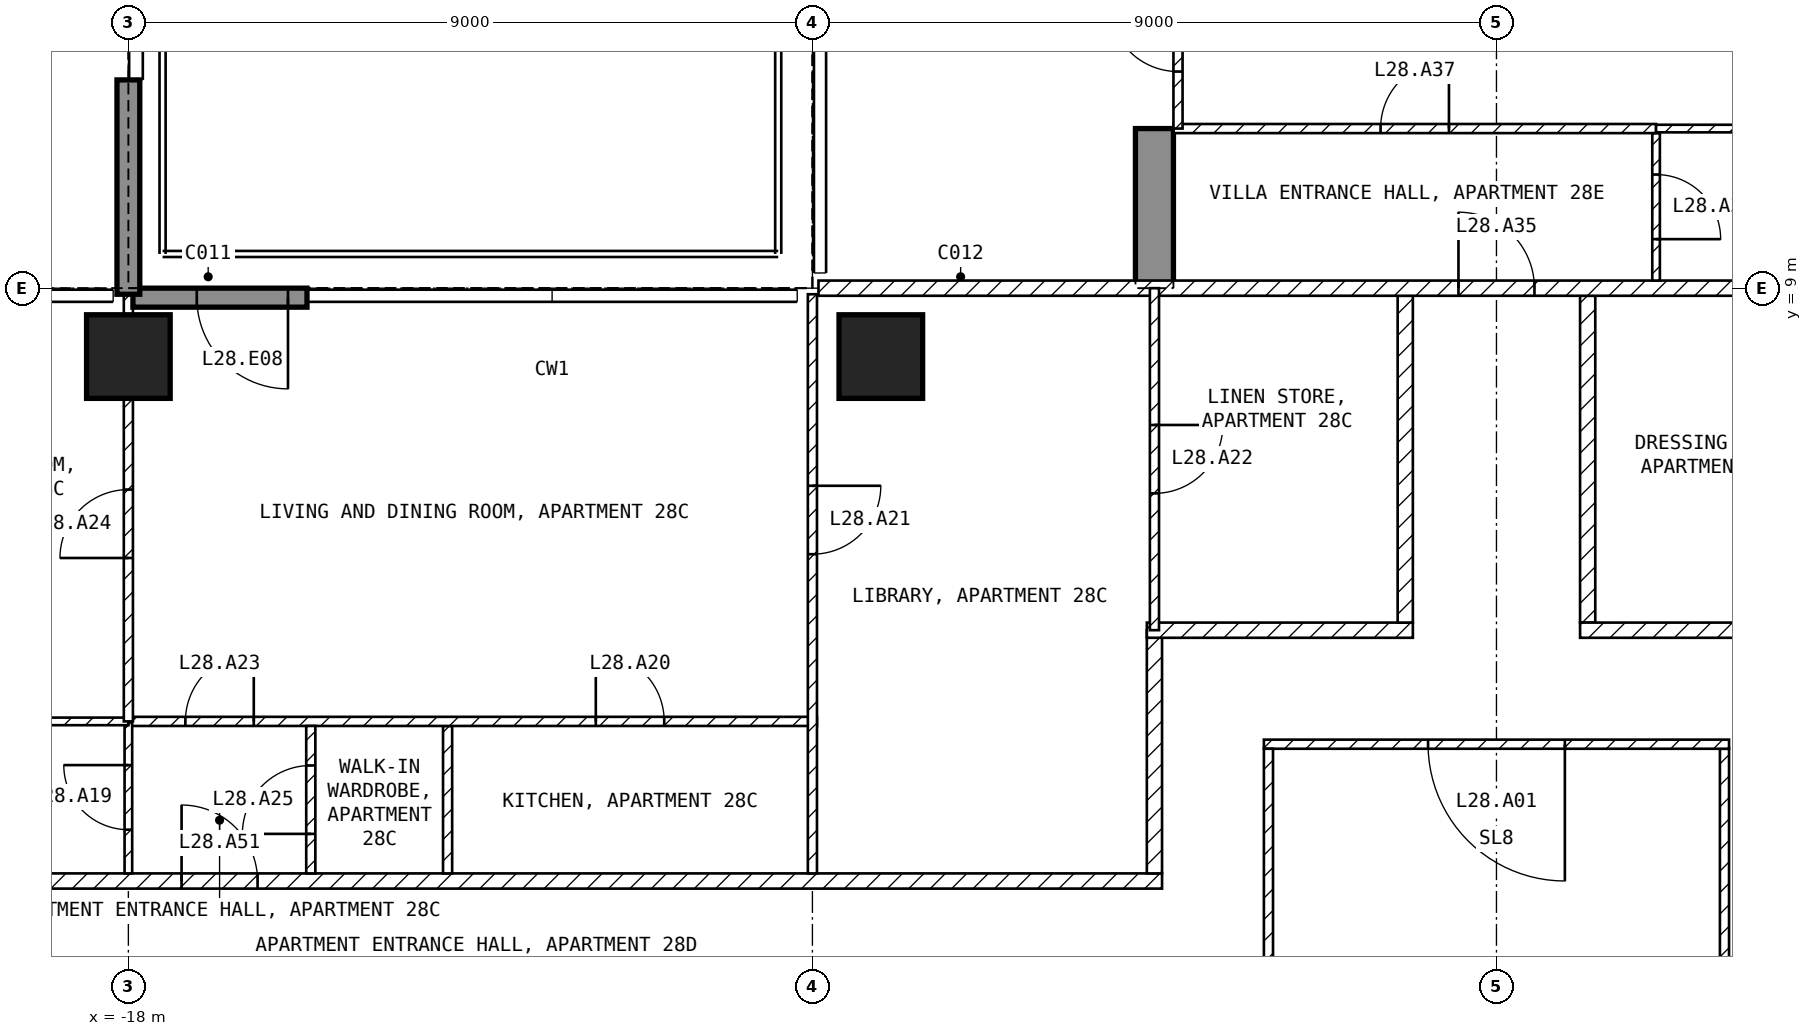
"""IFC4 building model, lengths in metres.
Left out: names, types, materials, properties, quantities, classifications, styles, units other than length and angle.
Written with IfcOpenShell. Run it as: python <this file> out.ifc"""

import sys

from ifc_helpers import new_model, si_unit, direction, frame, frame_2d, origin, origin_2d, place, context, subcontext, project, spatial, polyline, rectangle, outline, extrude, element, fill, save


model = new_model("IFC4")
c1 = context("Model", 3, precision=1e-05, world=origin(), true_north=direction((0.0, 1.0)))
c2 = subcontext(c1, "Body", "Model", "MODEL_VIEW")
j1 = project(units=[si_unit("LENGTHUNIT", "METRE"), si_unit("PLANEANGLEUNIT", "RADIAN")], contexts=[c1])
p1 = place(None, origin())
s1 = spatial("IfcSite", under=j1, at=p1, CompositionType="ELEMENT")
p2 = place(p1, origin())
s2 = spatial("IfcBuilding", under=s1, at=p2, CompositionType="ELEMENT")
p3 = place(p2, frame((0.0, 0.0, 119.9)))
s3 = spatial("IfcBuildingStorey", under=s2, at=p3, CompositionType="ELEMENT", Elevation=119.9)
for number, where, z_axis, x_axis in (
    (1, (-18.0, 8.1, -0.25), (0.0, 0.0, 1.0), (1.0, 0.0, 0.0)),
    (2, (-8.1, 8.1, -0.25), (0.0, 0.0, 1.0), (1.0, 0.0, 0.0)),
):
    element("IfcColumn", number, at=place(p3, frame(where, z_axis=z_axis, x_axis=x_axis)), inside=s3, PredefinedType="COLUMN", context=c2, shape_type="SweptSolid", body=[
        extrude(rectangle(XDim=1.1, YDim=1.1, at=origin_2d()), origin(), (0.0, 0.0, 1.0), 3.5),
    ])
p4 = place(p3, frame((-4.75, 9.0, -0.25), z_axis=(1.0, 0.0, 0.0), x_axis=(0.0, 1.0, 0.0)))
e3 = element("IfcWall", 3, at=p4, inside=s3, PredefinedType="SHEAR", context=c2, shape_type="SweptSolid", body=[
    extrude(outline(polyline([(0.0, 0.0), (2.1, 0.0), (2.1, 2.65), (4.5, 2.65), (4.5, 0.0), (9.9, 0.0), (9.9, 2.65), (12.3, 2.65), (12.3, 0.0), (16.55, 0.0), (16.55, 3.5), (0.0, 3.5), (0.0, 0.0)])), origin(), (0.0, 0.0, 1.0), 0.5),
])
p5 = place(p3, frame((-15.65, 8.875, 0.0), z_axis=(0.0, 0.0, 1.0), x_axis=(-1.0, 0.0, 0.0)))
e4 = element("IfcWall", 4, at=p5, inside=s3, PredefinedType="SOLIDWALL", context=c2, shape_type="SweptSolid", body=[
    extrude(rectangle(XDim=2.29, YDim=0.25, at=frame_2d((1.145, 0.0))), origin(), (0.0, 0.0, 1.0), 3.25),
])
p6 = place(p5, frame((0.25, 0.0, 0.0)))
e5 = element("IfcOpeningElement", 5, at=p6, cuts=e4, PredefinedType="OPENING", context=c2, shape_type="SweptSolid", body=[
    extrude(rectangle(XDim=1.2, YDim=2.4, at=frame_2d((0.6, 1.2))), frame((0.0, 0.135, 0.0), z_axis=(0.0, -1.0, 0.0), x_axis=(1.0, 0.0, 0.0)), (0.0, 0.0, 1.0), 0.27),
])
p7 = place(p3, frame((-18.0, 8.92, 0.0), z_axis=(0.0, 0.0, 1.0), x_axis=(0.0, 1.0, 0.0)))
e6 = element("IfcWall", 6, at=p7, inside=s3, PredefinedType="SOLIDWALL", context=c2, shape_type="SweptSolid", body=[
    extrude(rectangle(XDim=2.82, YDim=0.3, at=frame_2d((1.41, 0.0))), origin(), (0.0, 0.0, 1.0), 3.25),
])
p8 = place(p3, frame((3.0, -2.94, 0.0), z_axis=(0.0, 0.0, 1.0), x_axis=(0.0, 1.0, 0.0)))
e7 = element("IfcWall", 7, at=p8, inside=s3, PredefinedType="PARTITIONING", context=c2, shape_type="SweptSolid", body=[
    extrude(rectangle(XDim=5.88, YDim=0.12, at=frame_2d((2.94, 0.0))), origin(), (0.0, 0.0, 1.0), 3.25),
])
p9 = place(p3, frame((3.06, 3.0, 0.0), z_axis=(0.0, 0.0, 1.0), x_axis=(-1.0, 0.0, 0.0)))
e8 = element("IfcWall", 8, at=p9, inside=s3, PredefinedType="PARTITIONING", context=c2, shape_type="SweptSolid", body=[
    extrude(rectangle(XDim=6.12, YDim=0.12, at=frame_2d((3.06, 0.0))), origin(), (0.0, 0.0, 1.0), 3.25),
])
p10 = place(p9, frame((2.16, 0.0, 0.0)))
e9 = element("IfcOpeningElement", 9, at=p10, cuts=e8, PredefinedType="OPENING", context=c2, shape_type="SweptSolid", body=[
    extrude(rectangle(XDim=1.8, YDim=2.1, at=frame_2d((0.9, 1.05))), frame((0.0, 0.07, 0.0), z_axis=(0.0, -1.0, 0.0), x_axis=(1.0, 0.0, 0.0)), (0.0, 0.0, 1.0), 0.14),
])
p11 = place(p3, frame((-3.0, 2.94, 0.0), z_axis=(0.0, 0.0, 1.0), x_axis=(0.0, -1.0, 0.0)))
e10 = element("IfcWall", 10, at=p11, inside=s3, PredefinedType="PARTITIONING", context=c2, shape_type="SweptSolid", body=[
    extrude(rectangle(XDim=5.88, YDim=0.12, at=frame_2d((2.94, 0.0))), origin(), (0.0, 0.0, 1.0), 3.25),
])
p12 = place(p3, frame((1.2, 8.9, 0.0), z_axis=(0.0, 0.0, 1.0), x_axis=(0.0, -1.0, 0.0)))
e11 = element("IfcWall", 11, at=p12, inside=s3, PredefinedType="PARTITIONING", context=c2, shape_type="SweptSolid", body=[
    extrude(rectangle(XDim=4.3, YDim=0.2, at=frame_2d((2.15, 0.0))), origin(), (0.0, 0.0, 1.0), 3.25),
])
p13 = place(p3, frame((1.1, 4.5, 0.0), z_axis=(0.0, 0.0, 1.0), x_axis=(1.0, 0.0, 0.0)))
e12 = element("IfcWall", 12, at=p13, inside=s3, PredefinedType="PARTITIONING", context=c2, shape_type="SweptSolid", body=[
    extrude(rectangle(XDim=3.5, YDim=0.2, at=frame_2d((1.75, 0.0))), origin(), (0.0, 0.0, 1.0), 3.25),
])
p14 = place(p3, frame((-21.6, 1.2, 0.0), z_axis=(0.0, 0.0, 1.0), x_axis=(1.0, 0.0, 0.0)))
e13 = element("IfcWall", 13, at=p14, inside=s3, PredefinedType="PARTITIONING", context=c2, shape_type="SweptSolid", body=[
    extrude(rectangle(XDim=17.2, YDim=0.2, at=frame_2d((8.6, 0.0))), origin(), (0.0, 0.0, 1.0), 3.25),
])
p15 = place(p14, frame((4.3, 0.0, 0.0)))
e14 = element("IfcOpeningElement", 14, at=p15, cuts=e13, PredefinedType="OPENING", context=c2, shape_type="SweptSolid", body=[
    extrude(rectangle(XDim=1.0, YDim=2.1, at=frame_2d((0.5, 1.05))), frame((0.0, 0.11, 0.0), z_axis=(0.0, -1.0, 0.0), x_axis=(1.0, 0.0, 0.0)), (0.0, 0.0, 1.0), 0.22),
])
p16 = place(p3, frame((-4.5, 1.3, 0.0), z_axis=(0.0, 0.0, 1.0), x_axis=(0.0, 1.0, 0.0)))
e15 = element("IfcWall", 15, at=p16, inside=s3, PredefinedType="PARTITIONING", context=c2, shape_type="SweptSolid", body=[
    extrude(rectangle(XDim=3.2, YDim=0.2, at=frame_2d((1.6, 0.0))), origin(), (0.0, 0.0, 1.0), 3.25),
])
p17 = place(p3, frame((-4.6, 4.5, 0.0), z_axis=(0.0, 0.0, 1.0), x_axis=(1.0, 0.0, 0.0)))
e16 = element("IfcWall", 16, at=p17, inside=s3, PredefinedType="PARTITIONING", context=c2, shape_type="SweptSolid", body=[
    extrude(rectangle(XDim=3.5, YDim=0.2, at=frame_2d((1.75, 0.0))), origin(), (0.0, 0.0, 1.0), 3.25),
])
p18 = place(p3, frame((-1.2, 4.6, 0.0), z_axis=(0.0, 0.0, 1.0), x_axis=(0.0, 1.0, 0.0)))
e17 = element("IfcWall", 17, at=p18, inside=s3, PredefinedType="PARTITIONING", context=c2, shape_type="SweptSolid", body=[
    extrude(rectangle(XDim=4.3, YDim=0.2, at=frame_2d((2.15, 0.0))), origin(), (0.0, 0.0, 1.0), 3.25),
])
p19 = place(p3, frame((-8.92, 9.0, 0.0), z_axis=(0.0, 0.0, 1.0), x_axis=(1.0, 0.0, 0.0)))
e18 = element("IfcWall", 18, at=p19, inside=s3, PredefinedType="PARTITIONING", context=c2, shape_type="SweptSolid", body=[
    extrude(rectangle(XDim=17.84, YDim=0.2, at=frame_2d((8.92, 0.0))), origin(), (0.0, 0.0, 1.0), 3.25),
])
p20 = place(p19, frame((8.42, 0.0, 0.0)))
e19 = element("IfcOpeningElement", 19, at=p20, cuts=e18, PredefinedType="OPENING", context=c2, shape_type="SweptSolid", body=[
    extrude(rectangle(XDim=1.0, YDim=2.1, at=frame_2d((0.5, 1.05))), frame((0.0, 0.11, 0.0), z_axis=(0.0, -1.0, 0.0), x_axis=(1.0, 0.0, 0.0)), (0.0, 0.0, 1.0), 0.22),
])
p21 = place(p3, frame((-13.8, 1.3, 0.0), z_axis=(0.0, 0.0, 1.0), x_axis=(0.0, 1.0, 0.0)))
e20 = element("IfcWall", 20, at=p21, inside=s3, PredefinedType="PARTITIONING", context=c2, shape_type="SweptSolid", body=[
    extrude(rectangle(XDim=1.94, YDim=0.12, at=frame_2d((0.97, 0.0))), origin(), (0.0, 0.0, 1.0), 3.25),
])
p22 = place(p3, frame((-18.0, 3.3, 0.0), z_axis=(0.0, 0.0, 1.0), x_axis=(1.0, 0.0, 0.0)))
e21 = element("IfcWall", 21, at=p22, inside=s3, PredefinedType="PARTITIONING", context=c2, shape_type="SweptSolid", body=[
    extrude(rectangle(XDim=9.06, YDim=0.12, at=frame_2d((4.53, 0.0))), origin(), (0.0, 0.0, 1.0), 3.25),
])
p23 = place(p22, frame((6.15, 0.0, 0.0)))
e22 = element("IfcOpeningElement", 22, at=p23, cuts=e21, PredefinedType="OPENING", context=c2, shape_type="SweptSolid", body=[
    extrude(rectangle(XDim=0.9, YDim=2.1, at=frame_2d((0.45, 1.05))), frame((0.0, 0.07, 0.0), z_axis=(0.0, -1.0, 0.0), x_axis=(1.0, 0.0, 0.0)), (0.0, 0.0, 1.0), 0.14),
])
p24 = place(p22, frame((0.75, 0.0, 0.0)))
e23 = element("IfcOpeningElement", 23, at=p24, cuts=e21, PredefinedType="OPENING", context=c2, shape_type="SweptSolid", body=[
    extrude(rectangle(XDim=0.9, YDim=2.1, at=frame_2d((0.45, 1.05))), frame((0.0, 0.07, 0.0), z_axis=(0.0, -1.0, 0.0), x_axis=(1.0, 0.0, 0.0)), (0.0, 0.0, 1.0), 0.14),
])
p25 = place(p3, frame((-9.0, 8.92, 0.0), z_axis=(0.0, 0.0, 1.0), x_axis=(0.0, -1.0, 0.0)))
e24 = element("IfcWall", 24, at=p25, inside=s3, PredefinedType="PARTITIONING", context=c2, shape_type="SweptSolid", body=[
    extrude(rectangle(XDim=7.62, YDim=0.12, at=frame_2d((3.81, 0.0))), origin(), (0.0, 0.0, 1.0), 3.25),
])
p26 = place(p25, frame((2.52, 0.0, 0.0)))
e25 = element("IfcOpeningElement", 25, at=p26, cuts=e24, PredefinedType="OPENING", context=c2, shape_type="SweptSolid", body=[
    extrude(rectangle(XDim=0.9, YDim=2.1, at=frame_2d((0.45, 1.05))), frame((0.0, 0.07, 0.0), z_axis=(0.0, -1.0, 0.0), x_axis=(1.0, 0.0, 0.0)), (0.0, 0.0, 1.0), 0.14),
])
p27 = place(p3, frame((-15.6, 1.3, 0.0), z_axis=(0.0, 0.0, 1.0), x_axis=(0.0, 1.0, 0.0)))
e26 = element("IfcWall", 26, at=p27, inside=s3, PredefinedType="PARTITIONING", context=c2, shape_type="SweptSolid", body=[
    extrude(rectangle(XDim=1.94, YDim=0.12, at=frame_2d((0.97, 0.0))), origin(), (0.0, 0.0, 1.0), 3.25),
])
p28 = place(p27, frame((0.52, 0.0, 0.0)))
e27 = element("IfcOpeningElement", 27, at=p28, cuts=e26, PredefinedType="OPENING", context=c2, shape_type="SweptSolid", body=[
    extrude(rectangle(XDim=0.9, YDim=2.1, at=frame_2d((0.45, 1.05))), frame((0.0, 0.07, 0.0), z_axis=(0.0, -1.0, 0.0), x_axis=(1.0, 0.0, 0.0)), (0.0, 0.0, 1.0), 0.14),
])
p29 = place(p3, frame((-18.0, 1.3, 0.0), z_axis=(0.0, 0.0, 1.0), x_axis=(0.0, 1.0, 0.0)))
e28 = element("IfcWall", 28, at=p29, inside=s3, PredefinedType="PARTITIONING", context=c2, shape_type="SweptSolid", body=[
    extrude(rectangle(XDim=2.0, YDim=0.1, at=frame_2d((1.0, 0.0))), origin(), (0.0, 0.0, 1.0), 2.414),
])
p30 = place(p29, frame((0.575, 0.0, 0.0)))
e29 = element("IfcOpeningElement", 29, at=p30, cuts=e28, PredefinedType="OPENING", context=c2, shape_type="SweptSolid", body=[
    extrude(rectangle(XDim=0.85, YDim=2.1, at=frame_2d((0.425, 1.05))), frame((0.0, 0.06, 0.0), z_axis=(0.0, -1.0, 0.0), x_axis=(1.0, 0.0, 0.0)), (0.0, 0.0, 1.0), 0.12),
])
p31 = place(p3, frame((-21.6, 3.3, 0.0), z_axis=(0.0, 0.0, 1.0), x_axis=(1.0, 0.0, 0.0)))
e30 = element("IfcWall", 30, at=p31, inside=s3, PredefinedType="PARTITIONING", context=c2, shape_type="SweptSolid", body=[
    extrude(rectangle(XDim=3.6, YDim=0.1, at=frame_2d((1.8, 0.0))), origin(), (0.0, 0.0, 1.0), 3.25),
])
p32 = place(p3, frame((-18.0, 3.3, 0.0), z_axis=(0.0, 0.0, 1.0), x_axis=(0.0, 1.0, 0.0)))
e31 = element("IfcWall", 31, at=p32, inside=s3, PredefinedType="PARTITIONING", context=c2, shape_type="SweptSolid", body=[
    extrude(rectangle(XDim=5.62, YDim=0.12, at=frame_2d((2.81, 0.0))), origin(), (0.0, 0.0, 1.0), 2.414),
])
p33 = place(p32, frame((2.15, 0.0, 0.0)))
e32 = element("IfcOpeningElement", 32, at=p33, cuts=e31, PredefinedType="OPENING", context=c2, shape_type="SweptSolid", body=[
    extrude(rectangle(XDim=0.9, YDim=2.1, at=frame_2d((0.45, 1.05))), frame((0.0, 0.07, 0.0), z_axis=(0.0, -1.0, 0.0), x_axis=(1.0, 0.0, 0.0)), (0.0, 0.0, 1.0), 0.14),
])
p34 = place(p3, frame((-4.5, 9.0, 0.0), z_axis=(0.0, 0.0, 1.0), x_axis=(0.0, -1.0, 0.0)))
e33 = element("IfcWall", 33, at=p34, inside=s3, PredefinedType="PARTITIONING", context=c2, shape_type="SweptSolid", body=[
    extrude(rectangle(XDim=4.5, YDim=0.12, at=frame_2d((2.25, 0.0))), origin(), (0.0, 0.0, 1.0), 3.25),
])
p35 = place(p34, frame((1.8, 0.0, 0.0)))
e34 = element("IfcOpeningElement", 34, at=p35, cuts=e33, PredefinedType="OPENING", context=c2, shape_type="SweptSolid", body=[
    extrude(rectangle(XDim=0.9, YDim=2.1, at=frame_2d((0.45, 1.05))), frame((0.0, 0.07, 0.0), z_axis=(0.0, -1.0, 0.0), x_axis=(1.0, 0.0, 0.0)), (0.0, 0.0, 1.0), 0.14),
])
p36 = place(p3, frame((2.1, 11.04, 0.0), z_axis=(0.0, 0.0, 1.0), x_axis=(0.0, -1.0, 0.0)))
e35 = element("IfcWall", 35, at=p36, inside=s3, PredefinedType="PARTITIONING", context=c2, shape_type="SweptSolid", body=[
    extrude(rectangle(XDim=1.94, YDim=0.1, at=frame_2d((0.97, 0.0))), origin(), (0.0, 0.0, 1.0), 3.25),
])
p37 = place(p36, frame((0.545, 0.0, 0.0)))
e36 = element("IfcOpeningElement", 36, at=p37, cuts=e35, PredefinedType="OPENING", context=c2, shape_type="SweptSolid", body=[
    extrude(rectangle(XDim=0.85, YDim=2.1, at=frame_2d((0.425, 1.05))), frame((0.0, 0.06, 0.0), z_axis=(0.0, -1.0, 0.0), x_axis=(1.0, 0.0, 0.0)), (0.0, 0.0, 1.0), 0.12),
])
p38 = place(p3, frame((-4.25, 11.1, 0.0), z_axis=(0.0, 0.0, 1.0), x_axis=(1.0, 0.0, 0.0)))
e37 = element("IfcWall", 37, at=p38, inside=s3, PredefinedType="PARTITIONING", context=c2, shape_type="SweptSolid", body=[
    extrude(rectangle(XDim=6.35, YDim=0.12, at=frame_2d((3.175, 0.0))), origin(), (0.0, 0.0, 1.0), 3.25),
])
p39 = place(p38, frame((2.725, 0.0, 0.0)))
e38 = element("IfcOpeningElement", 38, at=p39, cuts=e37, PredefinedType="OPENING", context=c2, shape_type="SweptSolid", body=[
    extrude(rectangle(XDim=0.9, YDim=2.1, at=frame_2d((0.45, 1.05))), frame((0.0, 0.07, 0.0), z_axis=(0.0, -1.0, 0.0), x_axis=(1.0, 0.0, 0.0)), (0.0, 0.0, 1.0), 0.14),
])
p40 = place(p3, frame((2.1, 11.1, 0.0), z_axis=(0.0, 0.0, 1.0), x_axis=(1.0, 0.0, 0.0)))
e39 = element("IfcWall", 39, at=p40, inside=s3, PredefinedType="PARTITIONING", context=c2, shape_type="SweptSolid", body=[
    extrude(rectangle(XDim=2.15, YDim=0.1, at=frame_2d((1.075, 0.0))), origin(), (0.0, 0.0, 1.0), 3.25),
])
p41 = place(p3, frame((-4.19, 11.1, 0.0), z_axis=(0.0, 0.0, 1.0), x_axis=(0.0, 1.0, 0.0)))
e40 = element("IfcWall", 40, at=p41, inside=s3, PredefinedType="PARTITIONING", context=c2, shape_type="SweptSolid", body=[
    extrude(rectangle(XDim=2.4, YDim=0.12, at=frame_2d((1.2, 0.0))), origin(), (0.0, 0.0, 1.0), 2.4),
])
p42 = place(p41, frame((0.75, 0.0, 0.0)))
e41 = element("IfcOpeningElement", 41, at=p42, cuts=e40, PredefinedType="OPENING", context=c2, shape_type="SweptSolid", body=[
    extrude(rectangle(XDim=0.9, YDim=2.1, at=frame_2d((0.45, 1.05))), frame((0.0, 0.07, 0.0), z_axis=(0.0, -1.0, 0.0), x_axis=(1.0, 0.0, 0.0)), (0.0, 0.0, 1.0), 0.14),
])
p43 = place(p6, origin())
e42 = element("IfcDoor", 42, at=p43, inside=s3, OperationType="SINGLE_SWING_LEFT", PredefinedType="DOOR", context=c2, shape_type="SweptSolid", body=[
    extrude(rectangle(XDim=1.2, YDim=2.4, at=frame_2d((0.6, 1.2))), frame((0.0, 0.025, 0.0), z_axis=(0.0, -1.0, 0.0), x_axis=(1.0, 0.0, 0.0)), (0.0, 0.0, 1.0), 0.05),
])
fill(e5, e42)
p44 = place(p10, origin())
e43 = element("IfcDoor", 43, at=p44, inside=s3, OperationType="SINGLE_SWING_LEFT", PredefinedType="DOOR", context=c2, shape_type="SweptSolid", body=[
    extrude(rectangle(XDim=1.8, YDim=2.1, at=frame_2d((0.9, 1.05))), frame((0.0, 0.025, 0.0), z_axis=(0.0, -1.0, 0.0), x_axis=(1.0, 0.0, 0.0)), (0.0, 0.0, 1.0), 0.05),
])
fill(e9, e43)
p45 = place(p30, origin())
e44 = element("IfcDoor", 44, at=p45, inside=s3, OperationType="SINGLE_SWING_RIGHT", PredefinedType="DOOR", context=c2, shape_type="SweptSolid", body=[
    extrude(rectangle(XDim=0.85, YDim=2.1, at=frame_2d((0.425, 1.05))), frame((0.0, 0.025, 0.0), z_axis=(0.0, -1.0, 0.0), x_axis=(1.0, 0.0, 0.0)), (0.0, 0.0, 1.0), 0.05),
])
fill(e29, e44)
p46 = place(p23, origin())
e45 = element("IfcDoor", 45, at=p46, inside=s3, OperationType="SINGLE_SWING_LEFT", PredefinedType="DOOR", context=c2, shape_type="SweptSolid", body=[
    extrude(rectangle(XDim=0.9, YDim=2.1, at=frame_2d((0.45, 1.05))), frame((0.0, 0.025, 0.0), z_axis=(0.0, -1.0, 0.0), x_axis=(1.0, 0.0, 0.0)), (0.0, 0.0, 1.0), 0.05),
])
fill(e22, e45)
p47 = place(p26, origin())
e46 = element("IfcDoor", 46, at=p47, inside=s3, OperationType="SINGLE_SWING_LEFT", PredefinedType="DOOR", context=c2, shape_type="SweptSolid", body=[
    extrude(rectangle(XDim=0.9, YDim=2.1, at=frame_2d((0.45, 1.05))), frame((0.0, 0.025, 0.0), z_axis=(0.0, -1.0, 0.0), x_axis=(1.0, 0.0, 0.0)), (0.0, 0.0, 1.0), 0.05),
])
fill(e25, e46)
p48 = place(p35, origin())
e47 = element("IfcDoor", 47, at=p48, inside=s3, OperationType="SINGLE_SWING_LEFT", PredefinedType="DOOR", context=c2, shape_type="SweptSolid", body=[
    extrude(rectangle(XDim=0.9, YDim=2.1, at=frame_2d((0.45, 1.05))), frame((0.0, 0.025, 0.0), z_axis=(0.0, -1.0, 0.0), x_axis=(1.0, 0.0, 0.0)), (0.0, 0.0, 1.0), 0.05),
])
fill(e34, e47)
p49 = place(p24, origin())
e48 = element("IfcDoor", 48, at=p49, inside=s3, OperationType="SINGLE_SWING_RIGHT", PredefinedType="DOOR", context=c2, shape_type="SweptSolid", body=[
    extrude(rectangle(XDim=0.9, YDim=2.1, at=frame_2d((0.45, 1.05))), frame((0.0, 0.025, 0.0), z_axis=(0.0, -1.0, 0.0), x_axis=(1.0, 0.0, 0.0)), (0.0, 0.0, 1.0), 0.05),
])
fill(e23, e48)
p50 = place(p33, origin())
e49 = element("IfcDoor", 49, at=p50, inside=s3, OperationType="SINGLE_SWING_LEFT", PredefinedType="DOOR", context=c2, shape_type="SweptSolid", body=[
    extrude(rectangle(XDim=0.9, YDim=2.1, at=frame_2d((0.45, 1.05))), frame((0.0, 0.025, 0.0), z_axis=(0.0, -1.0, 0.0), x_axis=(1.0, 0.0, 0.0)), (0.0, 0.0, 1.0), 0.05),
])
fill(e32, e49)
p51 = place(p28, origin())
e50 = element("IfcDoor", 50, at=p51, inside=s3, OperationType="SINGLE_SWING_LEFT", PredefinedType="DOOR", context=c2, shape_type="SweptSolid", body=[
    extrude(rectangle(XDim=0.9, YDim=2.1, at=frame_2d((0.45, 1.05))), frame((0.0, 0.025, 0.0), z_axis=(0.0, -1.0, 0.0), x_axis=(1.0, 0.0, 0.0)), (0.0, 0.0, 1.0), 0.05),
])
fill(e27, e50)
p52 = place(p20, origin())
e51 = element("IfcDoor", 51, at=p52, inside=s3, OperationType="SINGLE_SWING_LEFT", PredefinedType="DOOR", context=c2, shape_type="SweptSolid", body=[
    extrude(rectangle(XDim=1.0, YDim=2.1, at=frame_2d((0.5, 1.05))), frame((0.0, 0.025, 0.0), z_axis=(0.0, -1.0, 0.0), x_axis=(1.0, 0.0, 0.0)), (0.0, 0.0, 1.0), 0.05),
])
fill(e19, e51)
p53 = place(p37, origin())
e52 = element("IfcDoor", 52, at=p53, inside=s3, OperationType="SINGLE_SWING_RIGHT", PredefinedType="DOOR", context=c2, shape_type="SweptSolid", body=[
    extrude(rectangle(XDim=0.85, YDim=2.1, at=frame_2d((0.425, 1.05))), frame((0.0, 0.025, 0.0), z_axis=(0.0, -1.0, 0.0), x_axis=(1.0, 0.0, 0.0)), (0.0, 0.0, 1.0), 0.05),
])
fill(e36, e52)
p54 = place(p39, origin())
e53 = element("IfcDoor", 53, at=p54, inside=s3, OperationType="SINGLE_SWING_RIGHT", PredefinedType="DOOR", context=c2, shape_type="SweptSolid", body=[
    extrude(rectangle(XDim=0.9, YDim=2.1, at=frame_2d((0.45, 1.05))), frame((0.0, 0.025, 0.0), z_axis=(0.0, -1.0, 0.0), x_axis=(1.0, 0.0, 0.0)), (0.0, 0.0, 1.0), 0.05),
])
fill(e38, e53)
p55 = place(p15, origin())
e54 = element("IfcDoor", 54, at=p55, inside=s3, OperationType="SINGLE_SWING_LEFT", PredefinedType="DOOR", context=c2, shape_type="SweptSolid", body=[
    extrude(rectangle(XDim=1.0, YDim=2.1, at=frame_2d((0.5, 1.05))), frame((0.0, 0.025, 0.0), z_axis=(0.0, -1.0, 0.0), x_axis=(1.0, 0.0, 0.0)), (0.0, 0.0, 1.0), 0.05),
])
fill(e14, e54)
p56 = place(p42, origin())
e55 = element("IfcDoor", 55, at=p56, inside=s3, OperationType="SINGLE_SWING_RIGHT", PredefinedType="DOOR", context=c2, shape_type="SweptSolid", body=[
    extrude(rectangle(XDim=0.9, YDim=2.1, at=frame_2d((0.45, 1.05))), frame((0.0, 0.025, 0.0), z_axis=(0.0, -1.0, 0.0), x_axis=(1.0, 0.0, 0.0)), (0.0, 0.0, 1.0), 0.05),
])
fill(e41, e55)
save(model, sys.argv[1])
